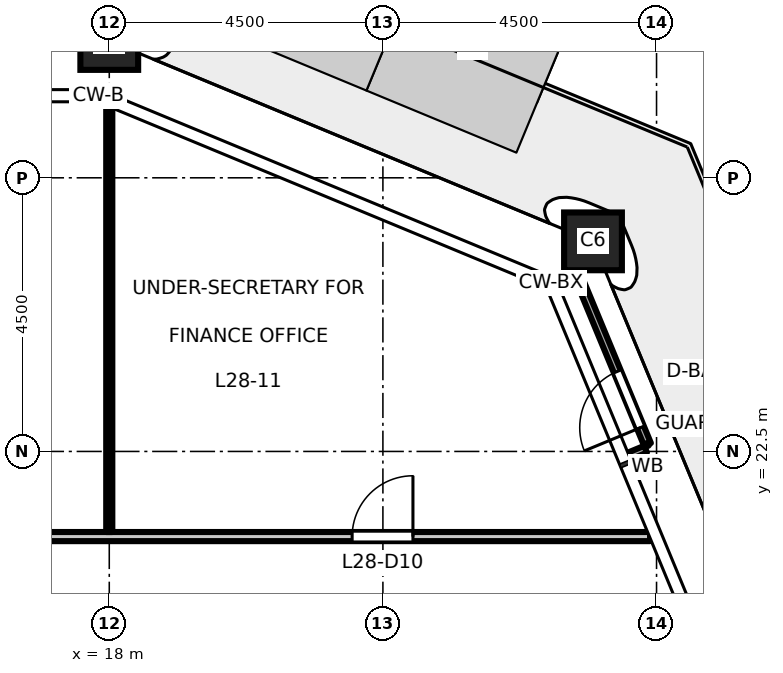
"""IFC4 building model, lengths in metres.
Left out: names, types, materials, properties, quantities, classifications, styles, units other than length and angle.
Written with IfcOpenShell. Run it as: python <this file> out.ifc"""

import sys

from ifc_helpers import new_model, si_unit, direction, frame, frame_2d, origin, origin_2d, place, context, subcontext, project, spatial, rectangle, hollow_rectangle, extrude, element, fill, save


model = new_model("IFC4")
c1 = context("Model", 3, precision=1e-05, world=origin(), true_north=direction((0.0, 1.0)))
c2 = subcontext(c1, "Body", "Model", "MODEL_VIEW")
j1 = project(units=[si_unit("LENGTHUNIT", "METRE"), si_unit("PLANEANGLEUNIT", "RADIAN")], contexts=[c1])
p1 = place(None, origin())
s1 = spatial("IfcSite", under=j1, at=p1, CompositionType="ELEMENT")
p2 = place(p1, origin())
s2 = spatial("IfcBuilding", under=s1, at=p2, CompositionType="ELEMENT")
p3 = place(p2, frame((0.0, 0.0, 131.7)))
s3 = spatial("IfcBuildingStorey", under=s2, at=p3, CompositionType="ELEMENT", Elevation=131.7)
for number, where, z_axis, x_axis in (
    (1, (25.955, 25.955, 0.0), (0.0, 0.0, 1.0), (1.0, 0.0, 0.0)),
    (2, (18.0, 29.25, 0.0), (0.0, 0.0, 1.0), (1.0, 0.0, 0.0)),
):
    element("IfcColumn", number, at=place(p3, frame(where, z_axis=z_axis, x_axis=x_axis)), inside=s3, PredefinedType="COLUMN", context=c2, shape_type="SweptSolid", body=[
        extrude(hollow_rectangle(XDim=0.95, YDim=0.95, WallThickness=0.055, at=origin_2d()), origin(), (0.0, 0.0, 1.0), 4.5),
    ])
for number, where, z_axis, x_axis in (
    (3, (26.551, 22.425, 0.0), (0.0, 0.0, 1.0), (0.924, 0.382, 0.0)),
    (4, (25.421, 25.153, 0.0), (0.0, 0.0, 1.0), (0.924, 0.383, 0.0)),
):
    element("IfcWall", number, at=place(p3, frame(where, z_axis=z_axis, x_axis=x_axis)), inside=s3, PredefinedType="STANDARD", context=c2, shape_type="SweptSolid", body=[
        extrude(rectangle(XDim=0.29, YDim=0.12, at=frame_2d((0.145, 0.0))), origin(), (0.0, 0.0, 1.0), 4.35),
    ])
p4 = place(p3, frame((26.852, 22.615, 0.0), z_axis=(0.0, 0.0, 1.0), x_axis=(-0.382708655389, 0.923869084389, 0.0)))
e5 = element("IfcWall", 5, at=p4, inside=s3, PredefinedType="STANDARD", context=c2, shape_type="SweptSolid", body=[
    extrude(rectangle(XDim=3.102, YDim=0.12, at=frame_2d((1.551, 0.0))), origin(), (0.0, 0.0, 1.0), 4.35),
])
p5 = place(p4, frame((0.3, 0.0, 0.0)))
e6 = element("IfcOpeningElement", 6, at=p5, cuts=e5, PredefinedType="OPENING", context=c2, shape_type="SweptSolid", body=[
    extrude(rectangle(XDim=1.0, YDim=2.4, at=frame_2d((0.5, 1.2))), frame((0.0, 0.07, 0.0), z_axis=(0.0, -1.0, 0.0), x_axis=(1.0, 0.0, 0.0)), (0.0, 0.0, 1.0), 0.14),
])
p6 = place(p3, frame((-26.894, 21.1, 0.0), z_axis=(0.0, 0.0, 1.0), x_axis=(1.0, 0.0, 0.0)))
e7 = element("IfcWall", 7, at=p6, inside=s3, PredefinedType="PARTITIONING", context=c2, shape_type="SweptSolid", body=[
    extrude(rectangle(XDim=53.788, YDim=0.15, at=frame_2d((26.894, 0.0))), origin(), (0.0, 0.0, 1.0), 4.35),
])
p7 = place(p6, frame((12.994, 0.0, 0.0)))
e8 = element("IfcOpeningElement", 8, at=p7, cuts=e7, PredefinedType="OPENING", context=c2, shape_type="SweptSolid", body=[
    extrude(rectangle(XDim=1.0, YDim=2.1, at=frame_2d((0.5, 1.05))), frame((0.0, 0.085, 0.0), z_axis=(0.0, -1.0, 0.0), x_axis=(1.0, 0.0, 0.0)), (0.0, 0.0, 1.0), 0.17),
])
p8 = place(p6, frame((21.994, 0.0, 0.0)))
e9 = element("IfcOpeningElement", 9, at=p8, cuts=e7, PredefinedType="OPENING", context=c2, shape_type="SweptSolid", body=[
    extrude(rectangle(XDim=1.0, YDim=2.1, at=frame_2d((0.5, 1.05))), frame((0.0, 0.085, 0.0), z_axis=(0.0, -1.0, 0.0), x_axis=(1.0, 0.0, 0.0)), (0.0, 0.0, 1.0), 0.17),
])
p9 = place(p6, frame((30.994, 0.0, 0.0)))
e10 = element("IfcOpeningElement", 10, at=p9, cuts=e7, PredefinedType="OPENING", context=c2, shape_type="SweptSolid", body=[
    extrude(rectangle(XDim=1.0, YDim=2.1, at=frame_2d((0.5, 1.05))), frame((0.0, 0.085, 0.0), z_axis=(0.0, -1.0, 0.0), x_axis=(1.0, 0.0, 0.0)), (0.0, 0.0, 1.0), 0.17),
])
p10 = place(p6, frame((39.994, 0.0, 0.0)))
e11 = element("IfcOpeningElement", 11, at=p10, cuts=e7, PredefinedType="OPENING", context=c2, shape_type="SweptSolid", body=[
    extrude(rectangle(XDim=1.0, YDim=2.1, at=frame_2d((0.5, 1.05))), frame((0.0, 0.085, 0.0), z_axis=(0.0, -1.0, 0.0), x_axis=(1.0, 0.0, 0.0)), (0.0, 0.0, 1.0), 0.17),
])
p11 = place(p6, frame((3.994, 0.0, 0.0)))
e12 = element("IfcOpeningElement", 12, at=p11, cuts=e7, PredefinedType="OPENING", context=c2, shape_type="SweptSolid", body=[
    extrude(rectangle(XDim=1.0, YDim=2.1, at=frame_2d((0.5, 1.05))), frame((0.0, 0.085, 0.0), z_axis=(0.0, -1.0, 0.0), x_axis=(1.0, 0.0, 0.0)), (0.0, 0.0, 1.0), 0.17),
])
p12 = place(p6, frame((48.888, 0.0, 0.0)))
e13 = element("IfcOpeningElement", 13, at=p12, cuts=e7, PredefinedType="OPENING", context=c2, shape_type="SweptSolid", body=[
    extrude(rectangle(XDim=1.0, YDim=2.1, at=frame_2d((0.5, 1.05))), frame((0.0, 0.085, 0.0), z_axis=(0.0, -1.0, 0.0), x_axis=(1.0, 0.0, 0.0)), (0.0, 0.0, 1.0), 0.17),
])
p13 = place(p3, frame((18.0, 21.175, 0.0), z_axis=(0.0, 0.0, 1.0), x_axis=(0.0, 1.0, 0.0)))
e14 = element("IfcWall", 14, at=p13, inside=s3, PredefinedType="PARTITIONING", context=c2, shape_type="SweptSolid", body=[
    extrude(rectangle(XDim=7.003, YDim=0.1, at=frame_2d((3.501, 0.0))), origin(), (0.0, 0.0, 1.0), 3.45),
])
p14 = place(p5, origin())
e15 = element("IfcDoor", 15, at=p14, inside=s3, OperationType="SINGLE_SWING_LEFT", PredefinedType="DOOR", context=c2, shape_type="SweptSolid", body=[
    extrude(rectangle(XDim=1.0, YDim=2.4, at=frame_2d((0.5, 1.2))), frame((0.0, 0.025, 0.0), z_axis=(0.0, -1.0, 0.0), x_axis=(1.0, 0.0, 0.0)), (0.0, 0.0, 1.0), 0.05),
])
fill(e6, e15)
p15 = place(p12, origin())
e16 = element("IfcDoor", 16, at=p15, inside=s3, OperationType="SINGLE_SWING_RIGHT", PredefinedType="DOOR", context=c2, shape_type="SweptSolid", body=[
    extrude(rectangle(XDim=1.0, YDim=2.1, at=frame_2d((0.5, 1.05))), frame((0.0, 0.025, 0.0), z_axis=(0.0, -1.0, 0.0), x_axis=(1.0, 0.0, 0.0)), (0.0, 0.0, 1.0), 0.05),
])
fill(e13, e16)
save(model, sys.argv[1])
